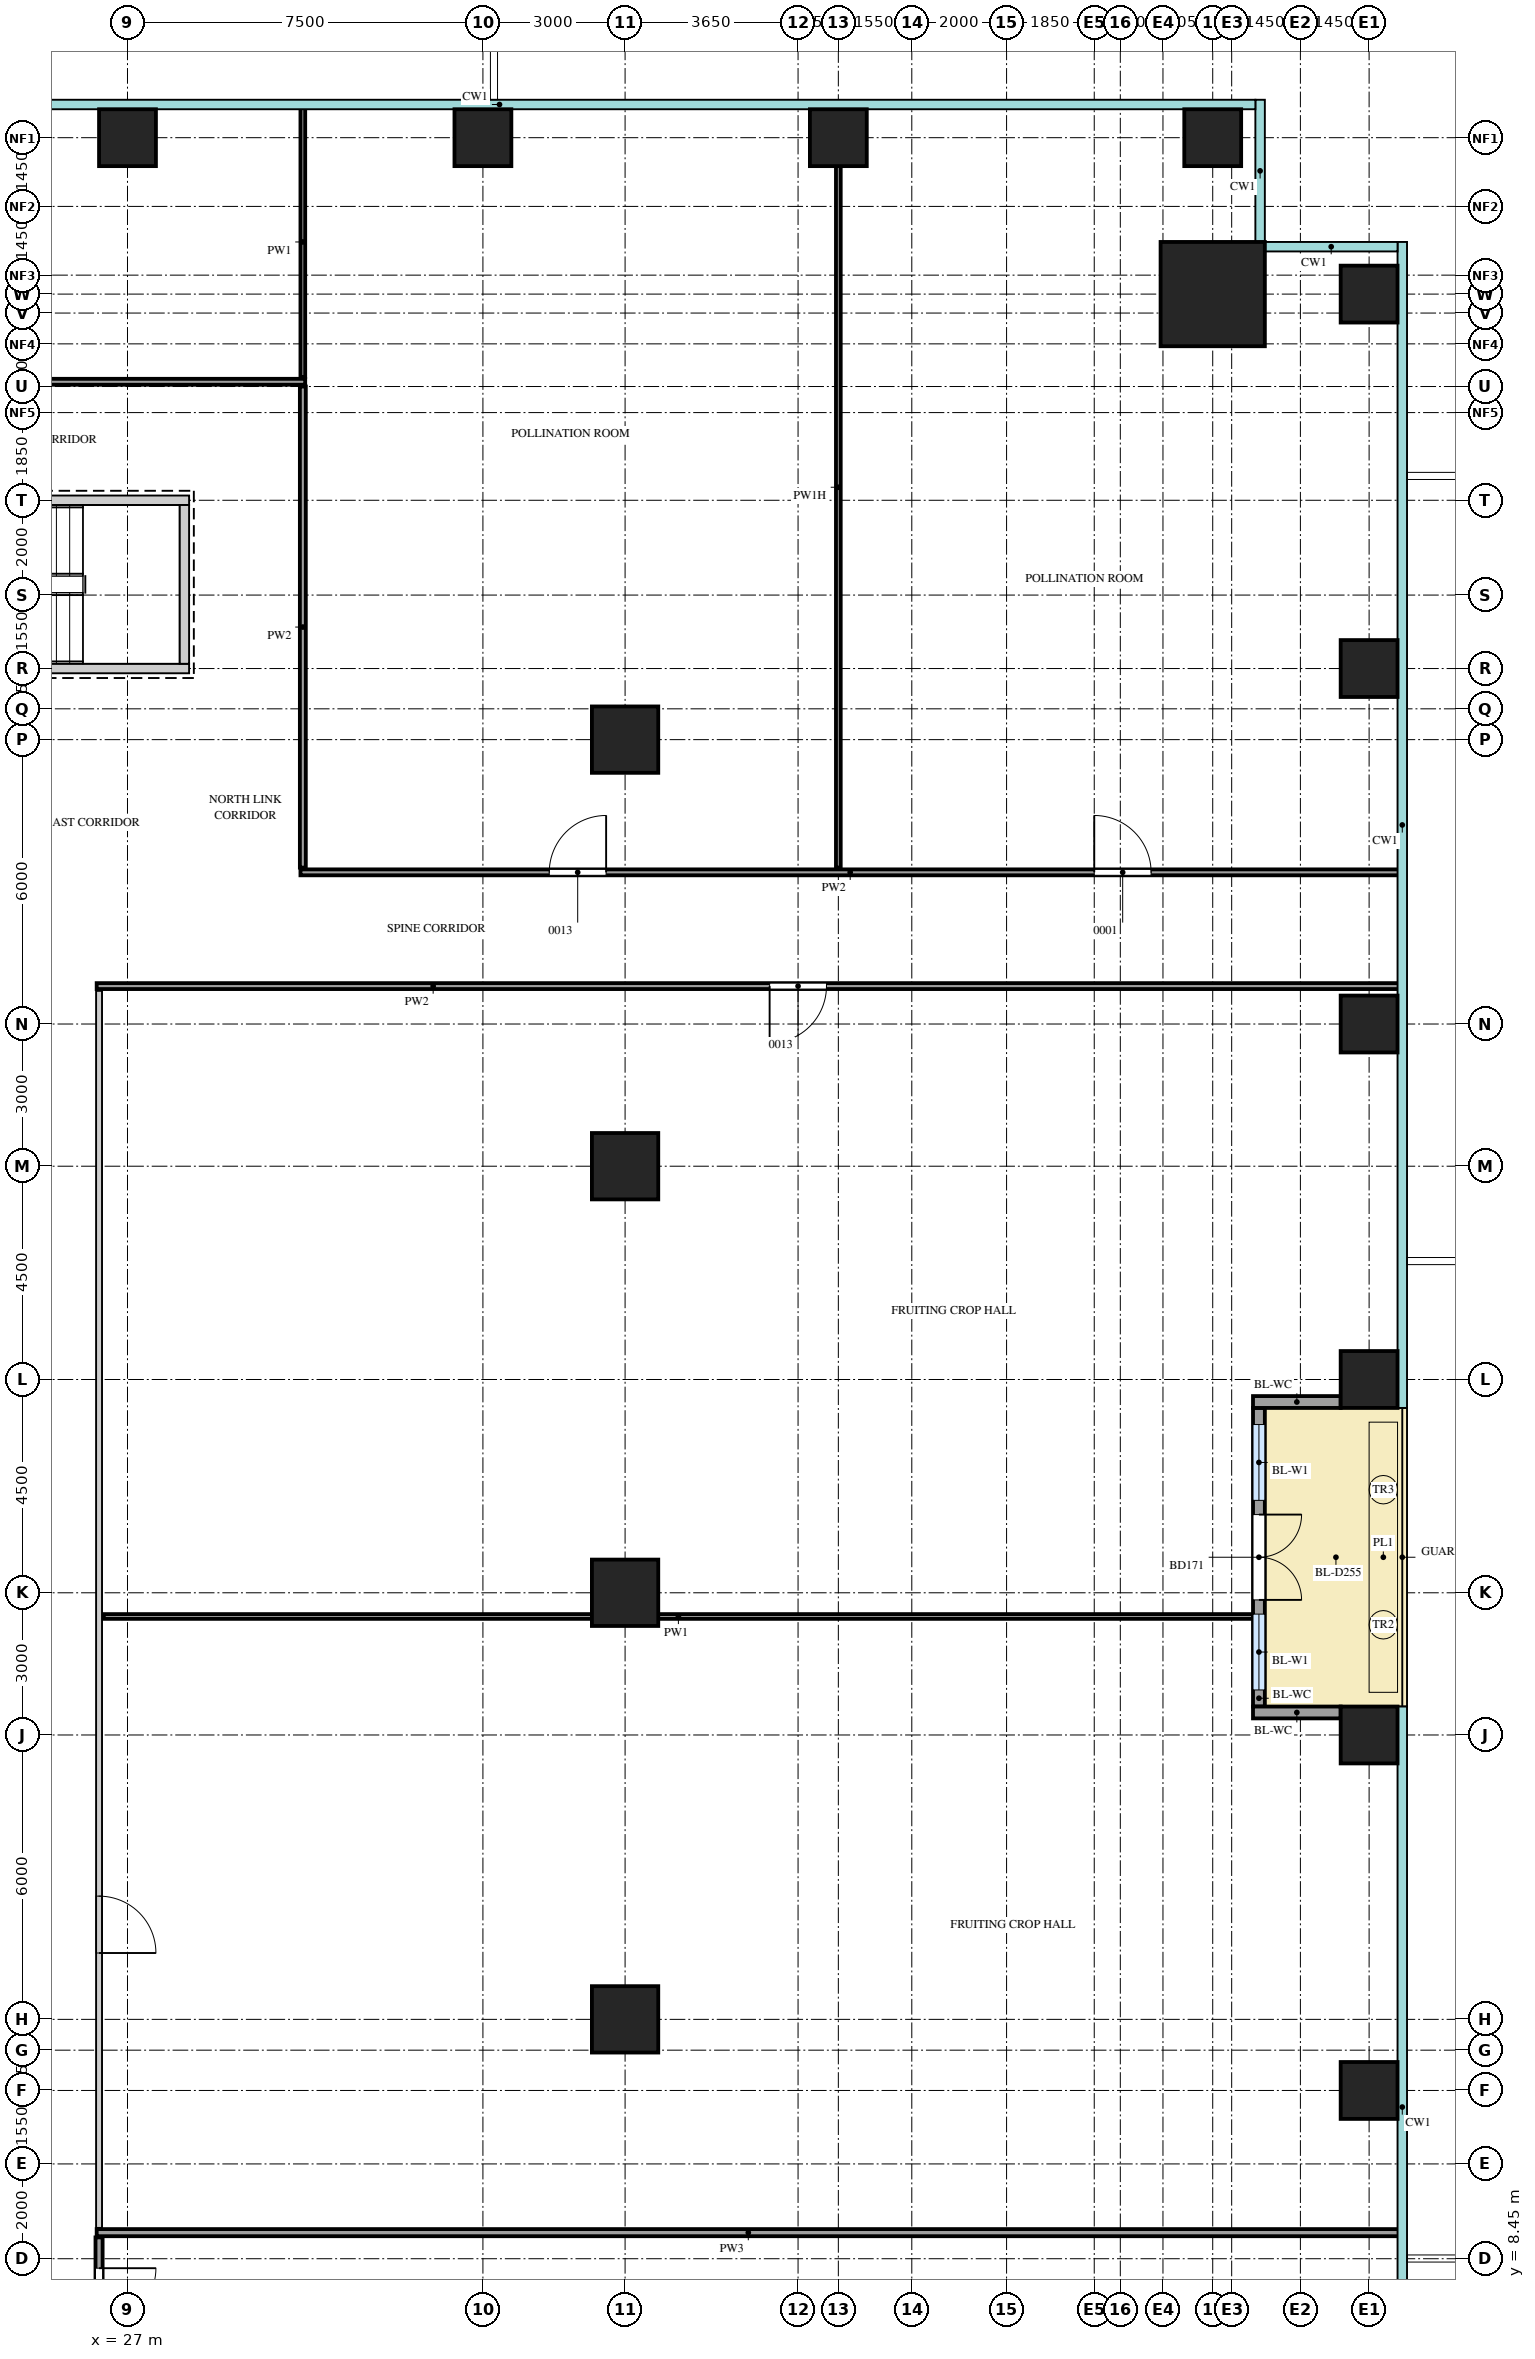
"""IFC4 building model, lengths in metres.
Left out: names, types, materials, properties, quantities, classifications, styles, units other than length and angle.
Written with IfcOpenShell. Run it as: python <this file> out.ifc"""

import sys

from ifc_helpers import new_model, si_unit, direction, frame, frame_2d, origin, origin_2d, place, context, subcontext, project, spatial, rectangle, extrude, source, transform, mapped, element, fill, save


model = new_model("IFC4")
c1 = context("Model", 3, precision=1e-05, world=origin(), true_north=direction((0.0, 1.0)))
c2 = subcontext(c1, "Body", "Model", "MODEL_VIEW")
j1 = project(units=[si_unit("LENGTHUNIT", "METRE"), si_unit("PLANEANGLEUNIT", "RADIAN")], contexts=[c1])
p1 = place(None, origin())
s1 = spatial("IfcSite", under=j1, at=p1, CompositionType="ELEMENT")
p2 = place(p1, origin())
s2 = spatial("IfcBuilding", under=s1, at=p2, CompositionType="ELEMENT")
p3 = place(p2, frame((0.0, 0.0, 82.5)))
s3 = spatial("IfcBuildingStorey", under=s2, at=p3, CompositionType="ELEMENT", Elevation=82.5)
m1 = source(origin(), c2, "Body", "SweptSolid", [
    extrude(rectangle(XDim=7.1, YDim=0.2, at=frame_2d((3.55, 0.0))), origin(), (0.0, 0.0, 1.0), 4.2),
])
p4 = place(p3, frame((21.2, 45.55, 0.0), z_axis=(0.0, 0.0, 1.0), x_axis=(1.0, 0.0, 0.0)))
e1 = element("IfcWall", 1, at=p4, inside=s3, PredefinedType="SHEAR", context=c2, shape_type="MappedRepresentation", body=[
    mapped(m1, transform((0.0, 0.0, 0.0))),
])
m2 = source(origin(), c2, "Body", "SweptSolid", [
    extrude(rectangle(XDim=1.2, YDim=2.1, at=frame_2d((0.6, 1.05))), frame((0.0, 0.11, 0.0), z_axis=(0.0, -1.0, 0.0), x_axis=(1.0, 0.0, 0.0)), (0.0, 0.0, 1.0), 0.22),
])
p5 = place(p4, frame((0.15, 0.0, 0.0)))
e2 = element("IfcOpeningElement", 2, at=p5, cuts=e1, PredefinedType="OPENING", context=c2, shape_type="MappedRepresentation", body=[
    mapped(m2, transform((0.0, 0.0, 0.0))),
])
p6 = place(p3, frame((21.2, 42.0, 0.0), z_axis=(0.0, 0.0, 1.0), x_axis=(1.0, 0.0, 0.0)))
e3 = element("IfcWall", 3, at=p6, inside=s3, PredefinedType="SHEAR", context=c2, shape_type="MappedRepresentation", body=[
    mapped(m1, transform((0.0, 0.0, 0.0))),
])
m3 = source(origin(), c2, "Body", "SweptSolid", [
    extrude(rectangle(XDim=3.35, YDim=0.2, at=frame_2d((1.675, 0.0))), origin(), (0.0, 0.0, 1.0), 4.2),
])
p7 = place(p3, frame((28.2, 42.1, 0.0), z_axis=(0.0, 0.0, 1.0), x_axis=(0.0, 1.0, 0.0)))
e4 = element("IfcWall", 4, at=p7, inside=s3, PredefinedType="SHEAR", context=c2, shape_type="MappedRepresentation", body=[
    mapped(m3, transform((0.0, 0.0, 0.0))),
])
m4 = source(origin(), c2, "Body", "SweptSolid", [
    extrude(rectangle(XDim=2.2, YDim=2.2, at=origin_2d()), origin(), (0.0, 0.0, 1.0), 4.5),
])
p8 = place(p3, frame((49.9, 49.9, 0.0), z_axis=(0.0, 0.0, 1.0), x_axis=(1.0, 0.0, 0.0)))
e5 = element("IfcColumn", 5, at=p8, inside=s3, PredefinedType="COLUMN", context=c2, shape_type="MappedRepresentation", body=[
    mapped(m4, transform((0.0, 0.0, 0.0))),
])
m5 = source(origin(), c2, "Body", "SweptSolid", [
    extrude(rectangle(XDim=1.2, YDim=1.2, at=origin_2d()), origin(), (0.0, 0.0, 1.0), 4.2),
])
for number, where, z_axis, x_axis in (
    (6, (53.2, 12.0, 0.0), (0.0, 0.0, 1.0), (1.0, 0.0, 0.0)),
    (7, (53.2, 19.5, 0.0), (0.0, 0.0, 1.0), (1.0, 0.0, 0.0)),
    (8, (53.2, 27.0, 0.0), (0.0, 0.0, 1.0), (1.0, 0.0, 0.0)),
    (9, (53.2, 34.5, 0.0), (0.0, 0.0, 1.0), (1.0, 0.0, 0.0)),
    (10, (53.2, 42.0, 0.0), (0.0, 0.0, 1.0), (1.0, 0.0, 0.0)),
    (11, (53.2, 49.9, 0.0), (0.0, 0.0, 1.0), (1.0, 0.0, 0.0)),
    (12, (27.0, 53.2, 0.0), (0.0, 0.0, 1.0), (1.0, 0.0, 0.0)),
    (13, (34.5, 53.2, 0.0), (0.0, 0.0, 1.0), (1.0, 0.0, 0.0)),
    (14, (42.0, 53.2, 0.0), (0.0, 0.0, 1.0), (1.0, 0.0, 0.0)),
    (15, (49.9, 53.2, 0.0), (0.0, 0.0, 1.0), (1.0, 0.0, 0.0)),
):
    element("IfcColumn", number, at=place(p3, frame(where, z_axis=z_axis, x_axis=x_axis)), inside=s3, PredefinedType="COLUMN", context=c2, shape_type="MappedRepresentation", body=[
        mapped(m5, transform((0.0, 0.0, 0.0))),
    ])
m6 = source(origin(), c2, "Body", "SweptSolid", [
    extrude(rectangle(XDim=1.4, YDim=1.4, at=origin_2d()), origin(), (0.0, 0.0, 1.0), 4.2),
])
for number, where, z_axis, x_axis in (
    (16, (37.5, 13.5, 0.0), (0.0, 0.0, 1.0), (1.0, 0.0, 0.0)),
    (17, (37.5, 22.5, 0.0), (0.0, 0.0, 1.0), (1.0, 0.0, 0.0)),
    (18, (37.5, 31.5, 0.0), (0.0, 0.0, 1.0), (1.0, 0.0, 0.0)),
    (19, (37.5, 40.5, 0.0), (0.0, 0.0, 1.0), (1.0, 0.0, 0.0)),
):
    element("IfcColumn", number, at=place(p3, frame(where, z_axis=z_axis, x_axis=x_axis)), inside=s3, PredefinedType="COLUMN", context=c2, shape_type="MappedRepresentation", body=[
        mapped(m6, transform((0.0, 0.0, 0.0))),
    ])
m7 = source(origin(), c2, "Body", "SweptSolid", [
    extrude(rectangle(XDim=6.3, YDim=0.25, at=frame_2d((3.15, 0.0))), origin(), (0.0, 0.0, 1.0), 3.6),
])
p9 = place(p3, frame((50.875, 20.1, 0.0), z_axis=(0.0, 0.0, 1.0), x_axis=(0.0, 1.0, 0.0)))
e20 = element("IfcWall", 20, at=p9, inside=s3, PredefinedType="SOLIDWALL", context=c2, shape_type="MappedRepresentation", body=[
    mapped(m7, transform((0.0, 0.0, 0.0))),
])
m8 = source(origin(), c2, "Body", "SweptSolid", [
    extrude(rectangle(XDim=1.6, YDim=2.4, at=frame_2d((0.8, 1.2))), frame((0.0, 0.135, 0.0), z_axis=(0.0, -1.0, 0.0), x_axis=(1.0, 0.0, 0.0)), (0.0, 0.0, 1.0), 0.27),
])
p10 = place(p9, frame((0.35, 0.0, 0.0)))
e21 = element("IfcOpeningElement", 21, at=p10, cuts=e20, PredefinedType="OPENING", context=c2, shape_type="MappedRepresentation", body=[
    mapped(m8, transform((0.0, 0.0, 0.0))),
])
p11 = place(p9, frame((4.35, 0.0, 0.0)))
e22 = element("IfcOpeningElement", 22, at=p11, cuts=e20, PredefinedType="OPENING", context=c2, shape_type="MappedRepresentation", body=[
    mapped(m8, transform((0.0, 0.0, 0.0))),
])
m9 = source(origin(), c2, "Body", "SweptSolid", [
    extrude(rectangle(XDim=1.8, YDim=2.4, at=frame_2d((0.9, 1.2))), frame((0.0, 0.135, 0.0), z_axis=(0.0, -1.0, 0.0), x_axis=(1.0, 0.0, 0.0)), (0.0, 0.0, 1.0), 0.27),
])
p12 = place(p9, frame((2.25, 0.0, 0.0)))
e23 = element("IfcOpeningElement", 23, at=p12, cuts=e20, PredefinedType="OPENING", context=c2, shape_type="MappedRepresentation", body=[
    mapped(m9, transform((0.0, 0.0, 0.0))),
])
m10 = source(origin(), c2, "Body", "SweptSolid", [
    extrude(rectangle(XDim=1.85, YDim=0.25, at=frame_2d((0.925, 0.0))), origin(), (0.0, 0.0, 1.0), 3.6),
])
for number, where, z_axis, x_axis in (
    (24, (52.6, 19.975, 0.0), (0.0, 0.0, 1.0), (-1.0, 0.0, 0.0)),
    (25, (52.6, 26.525, 0.0), (0.0, 0.0, 1.0), (-1.0, 0.0, 0.0)),
):
    element("IfcWall", number, at=place(p3, frame(where, z_axis=z_axis, x_axis=x_axis)), inside=s3, PredefinedType="SOLIDWALL", context=c2, shape_type="MappedRepresentation", body=[
        mapped(m10, transform((0.0, 0.0, 0.0))),
    ])
m11 = source(origin(), c2, "Body", "SweptSolid", [
    extrude(rectangle(XDim=8.75, YDim=0.15, at=frame_2d((4.375, 0.0))), origin(), (0.0, 0.0, 1.0), 4.3),
])
p13 = place(p3, frame((26.4, 0.15, 0.0), z_axis=(0.0, 0.0, 1.0), x_axis=(0.0, 1.0, 0.0)))
e26 = element("IfcWall", 26, at=p13, inside=s3, PredefinedType="PARTITIONING", context=c2, shape_type="MappedRepresentation", body=[
    mapped(m11, transform((0.0, 0.0, 0.0))),
])
m12 = source(origin(), c2, "Body", "SweptSolid", [
    extrude(rectangle(XDim=1.2, YDim=2.1, at=frame_2d((0.6, 1.05))), frame((0.0, 0.085, 0.0), z_axis=(0.0, -1.0, 0.0), x_axis=(1.0, 0.0, 0.0)), (0.0, 0.0, 1.0), 0.17),
])
p14 = place(p13, frame((6.9, 0.0, 0.0)))
e27 = element("IfcOpeningElement", 27, at=p14, cuts=e26, PredefinedType="OPENING", context=c2, shape_type="MappedRepresentation", body=[
    mapped(m12, transform((0.0, 0.0, 0.0))),
])
m13 = source(origin(), c2, "Body", "SweptSolid", [
    extrude(rectangle(XDim=27.5, YDim=0.15, at=frame_2d((13.75, 0.0))), origin(), (0.0, 0.0, 1.0), 4.3),
])
p15 = place(p3, frame((26.35, 9.0, 0.0), z_axis=(0.0, 0.0, 1.0), x_axis=(1.0, 0.0, 0.0)))
e28 = element("IfcWall", 28, at=p15, inside=s3, PredefinedType="PARTITIONING", context=c2, shape_type="MappedRepresentation", body=[
    mapped(m13, transform((0.0, 0.0, 0.0))),
])
m14 = source(origin(), c2, "Body", "SweptSolid", [
    extrude(rectangle(XDim=26.1, YDim=0.125, at=frame_2d((13.05, 0.0))), origin(), (0.0, 0.0, 1.0), 4.3),
])
p16 = place(p3, frame((26.4, 9.1, 0.0), z_axis=(0.0, 0.0, 1.0), x_axis=(0.0, 1.0, 0.0)))
e29 = element("IfcWall", 29, at=p16, inside=s3, PredefinedType="PARTITIONING", context=c2, shape_type="MappedRepresentation", body=[
    mapped(m14, transform((0.0, 0.0, 0.0))),
])
m15 = source(origin(), c2, "Body", "SweptSolid", [
    extrude(rectangle(XDim=1.2, YDim=2.1, at=frame_2d((0.6, 1.05))), frame((0.0, 0.073, 0.0), z_axis=(0.0, -1.0, 0.0), x_axis=(1.0, 0.0, 0.0)), (0.0, 0.0, 1.0), 0.145),
])
p17 = place(p16, frame((5.8, 0.0, 0.0)))
e30 = element("IfcOpeningElement", 30, at=p17, cuts=e29, PredefinedType="OPENING", context=c2, shape_type="MappedRepresentation", body=[
    mapped(m15, transform((0.0, 0.0, 0.0))),
])
m16 = source(origin(), c2, "Body", "SweptSolid", [
    extrude(rectangle(XDim=24.25, YDim=0.1, at=frame_2d((12.125, 0.0))), origin(), (0.0, 0.0, 1.0), 4.3),
])
p18 = place(p3, frame((26.5, 22.0, 0.0), z_axis=(0.0, 0.0, 1.0), x_axis=(1.0, 0.0, 0.0)))
e31 = element("IfcWall", 31, at=p18, inside=s3, PredefinedType="PARTITIONING", context=c2, shape_type="MappedRepresentation", body=[
    mapped(m16, transform((0.0, 0.0, 0.0))),
])
m17 = source(origin(), c2, "Body", "SweptSolid", [
    extrude(rectangle(XDim=27.5, YDim=0.125, at=frame_2d((13.75, 0.0))), origin(), (0.0, 0.0, 1.0), 4.3),
])
p19 = place(p3, frame((26.35, 35.3, 0.0), z_axis=(0.0, 0.0, 1.0), x_axis=(1.0, 0.0, 0.0)))
e32 = element("IfcWall", 32, at=p19, inside=s3, PredefinedType="PARTITIONING", context=c2, shape_type="MappedRepresentation", body=[
    mapped(m17, transform((0.0, 0.0, 0.0))),
])
p20 = place(p19, frame((14.2, 0.0, 0.0)))
e33 = element("IfcOpeningElement", 33, at=p20, cuts=e32, PredefinedType="OPENING", context=c2, shape_type="MappedRepresentation", body=[
    mapped(m15, transform((0.0, 0.0, 0.0))),
])
m18 = source(origin(), c2, "Body", "SweptSolid", [
    extrude(rectangle(XDim=23.2, YDim=0.125, at=frame_2d((11.6, 0.0))), origin(), (0.0, 0.0, 1.0), 4.3),
])
p21 = place(p3, frame((30.65, 37.7, 0.0), z_axis=(0.0, 0.0, 1.0), x_axis=(1.0, 0.0, 0.0)))
e34 = element("IfcWall", 34, at=p21, inside=s3, PredefinedType="PARTITIONING", context=c2, shape_type="MappedRepresentation", body=[
    mapped(m18, transform((0.0, 0.0, 0.0))),
])
p22 = place(p21, frame((5.25, 0.0, 0.0)))
e35 = element("IfcOpeningElement", 35, at=p22, cuts=e34, PredefinedType="OPENING", context=c2, shape_type="MappedRepresentation", body=[
    mapped(m15, transform((0.0, 0.0, 0.0))),
])
p23 = place(p21, frame((16.75, 0.0, 0.0)))
e36 = element("IfcOpeningElement", 36, at=p23, cuts=e34, PredefinedType="OPENING", context=c2, shape_type="MappedRepresentation", body=[
    mapped(m15, transform((0.0, 0.0, 0.0))),
])
m19 = source(origin(), c2, "Body", "SweptSolid", [
    extrude(rectangle(XDim=10.15, YDim=0.125, at=frame_2d((5.075, 0.0))), origin(), (0.0, 0.0, 1.0), 4.3),
])
p24 = place(p3, frame((30.7, 37.8, 0.0), z_axis=(0.0, 0.0, 1.0), x_axis=(0.0, 1.0, 0.0)))
e37 = element("IfcWall", 37, at=p24, inside=s3, PredefinedType="PARTITIONING", context=c2, shape_type="MappedRepresentation", body=[
    mapped(m19, transform((0.0, 0.0, 0.0))),
])
m20 = source(origin(), c2, "Body", "SweptSolid", [
    extrude(rectangle(XDim=16.05, YDim=0.1, at=frame_2d((8.025, 0.0))), origin(), (0.0, 0.0, 1.0), 3.7),
])
p25 = place(p3, frame((42.0, 37.8, 0.0), z_axis=(0.0, 0.0, 1.0), x_axis=(0.0, 1.0, 0.0)))
e38 = element("IfcWall", 38, at=p25, inside=s3, PredefinedType="PARTITIONING", context=c2, shape_type="MappedRepresentation", body=[
    mapped(m20, transform((0.0, 0.0, 0.0))),
])
m21 = source(origin(), c2, "Body", "SweptSolid", [
    extrude(rectangle(XDim=18.8, YDim=0.125, at=frame_2d((9.4, 0.0))), origin(), (0.0, 0.0, 1.0), 4.3),
])
p26 = place(p3, frame((11.95, 48.05, 0.0), z_axis=(0.0, 0.0, 1.0), x_axis=(1.0, 0.0, 0.0)))
e39 = element("IfcWall", 39, at=p26, inside=s3, PredefinedType="PARTITIONING", context=c2, shape_type="MappedRepresentation", body=[
    mapped(m21, transform((0.0, 0.0, 0.0))),
])
p27 = place(p26, frame((8.8, 0.0, 0.0)))
e40 = element("IfcOpeningElement", 40, at=p27, cuts=e39, PredefinedType="OPENING", context=c2, shape_type="MappedRepresentation", body=[
    mapped(m15, transform((0.0, 0.0, 0.0))),
])
m22 = source(origin(), c2, "Body", "SweptSolid", [
    extrude(rectangle(XDim=5.7, YDim=0.1, at=frame_2d((2.85, 0.0))), origin(), (0.0, 0.0, 1.0), 4.3),
])
p28 = place(p3, frame((30.7, 48.15, 0.0), z_axis=(0.0, 0.0, 1.0), x_axis=(0.0, 1.0, 0.0)))
e41 = element("IfcWall", 41, at=p28, inside=s3, PredefinedType="PARTITIONING", context=c2, shape_type="MappedRepresentation", body=[
    mapped(m22, transform((0.0, 0.0, 0.0))),
])
m23 = source(origin(), c2, "Body", "SweptSolid", [
    extrude(rectangle(XDim=1.6, YDim=2.4, at=frame_2d((0.8, 1.2))), frame((0.0, 0.03, 0.0), z_axis=(0.0, -1.0, 0.0), x_axis=(1.0, 0.0, 0.0)), (0.0, 0.0, 1.0), 0.06),
])
p29 = place(p10, origin())
e42 = element("IfcWindow", 42, at=p29, inside=s3, PartitioningType="SINGLE_PANEL", PredefinedType="WINDOW", context=c2, shape_type="MappedRepresentation", body=[
    mapped(m23, transform((0.0, 0.0, 0.0))),
])
fill(e21, e42)
p30 = place(p11, origin())
e43 = element("IfcWindow", 43, at=p30, inside=s3, PartitioningType="SINGLE_PANEL", PredefinedType="WINDOW", context=c2, shape_type="MappedRepresentation", body=[
    mapped(m23, transform((0.0, 0.0, 0.0))),
])
fill(e22, e43)
m24 = source(origin(), c2, "Body", "SweptSolid", [
    extrude(rectangle(XDim=1.8, YDim=2.4, at=frame_2d((0.9, 1.2))), frame((0.0, 0.025, 0.0), z_axis=(0.0, -1.0, 0.0), x_axis=(1.0, 0.0, 0.0)), (0.0, 0.0, 1.0), 0.05),
])
p31 = place(p12, origin())
e44 = element("IfcDoor", 44, at=p31, inside=s3, OperationType="DOUBLE_DOOR_DOUBLE_SWING", PredefinedType="DOOR", context=c2, shape_type="MappedRepresentation", body=[
    mapped(m24, transform((0.0, 0.0, 0.0))),
])
fill(e23, e44)
m25 = source(origin(), c2, "Body", "SweptSolid", [
    extrude(rectangle(XDim=1.2, YDim=2.1, at=frame_2d((0.6, 1.05))), frame((0.0, 0.025, 0.0), z_axis=(0.0, -1.0, 0.0), x_axis=(1.0, 0.0, 0.0)), (0.0, 0.0, 1.0), 0.05),
])
p32 = place(p14, origin())
e45 = element("IfcDoor", 45, at=p32, inside=s3, OperationType="SINGLE_SWING_RIGHT", PredefinedType="DOOR", context=c2, shape_type="MappedRepresentation", body=[
    mapped(m25, transform((0.0, 0.0, 0.0))),
])
fill(e27, e45)
p33 = place(p17, origin())
e46 = element("IfcDoor", 46, at=p33, inside=s3, OperationType="SINGLE_SWING_LEFT", PredefinedType="DOOR", context=c2, shape_type="MappedRepresentation", body=[
    mapped(m25, transform((0.0, 0.0, 0.0))),
])
fill(e30, e46)
p34 = place(p20, origin())
e47 = element("IfcDoor", 47, at=p34, inside=s3, OperationType="SINGLE_SWING_LEFT", PredefinedType="DOOR", context=c2, shape_type="MappedRepresentation", body=[
    mapped(m25, transform((0.0, 0.0, 0.0))),
])
fill(e33, e47)
p35 = place(p22, origin())
e48 = element("IfcDoor", 48, at=p35, inside=s3, OperationType="SINGLE_SWING_LEFT", PredefinedType="DOOR", context=c2, shape_type="MappedRepresentation", body=[
    mapped(m25, transform((0.0, 0.0, 0.0))),
])
fill(e35, e48)
p36 = place(p23, origin())
e49 = element("IfcDoor", 49, at=p36, inside=s3, OperationType="SINGLE_SWING_RIGHT", PredefinedType="DOOR", context=c2, shape_type="MappedRepresentation", body=[
    mapped(m25, transform((0.0, 0.0, 0.0))),
])
fill(e36, e49)
save(model, sys.argv[1])
